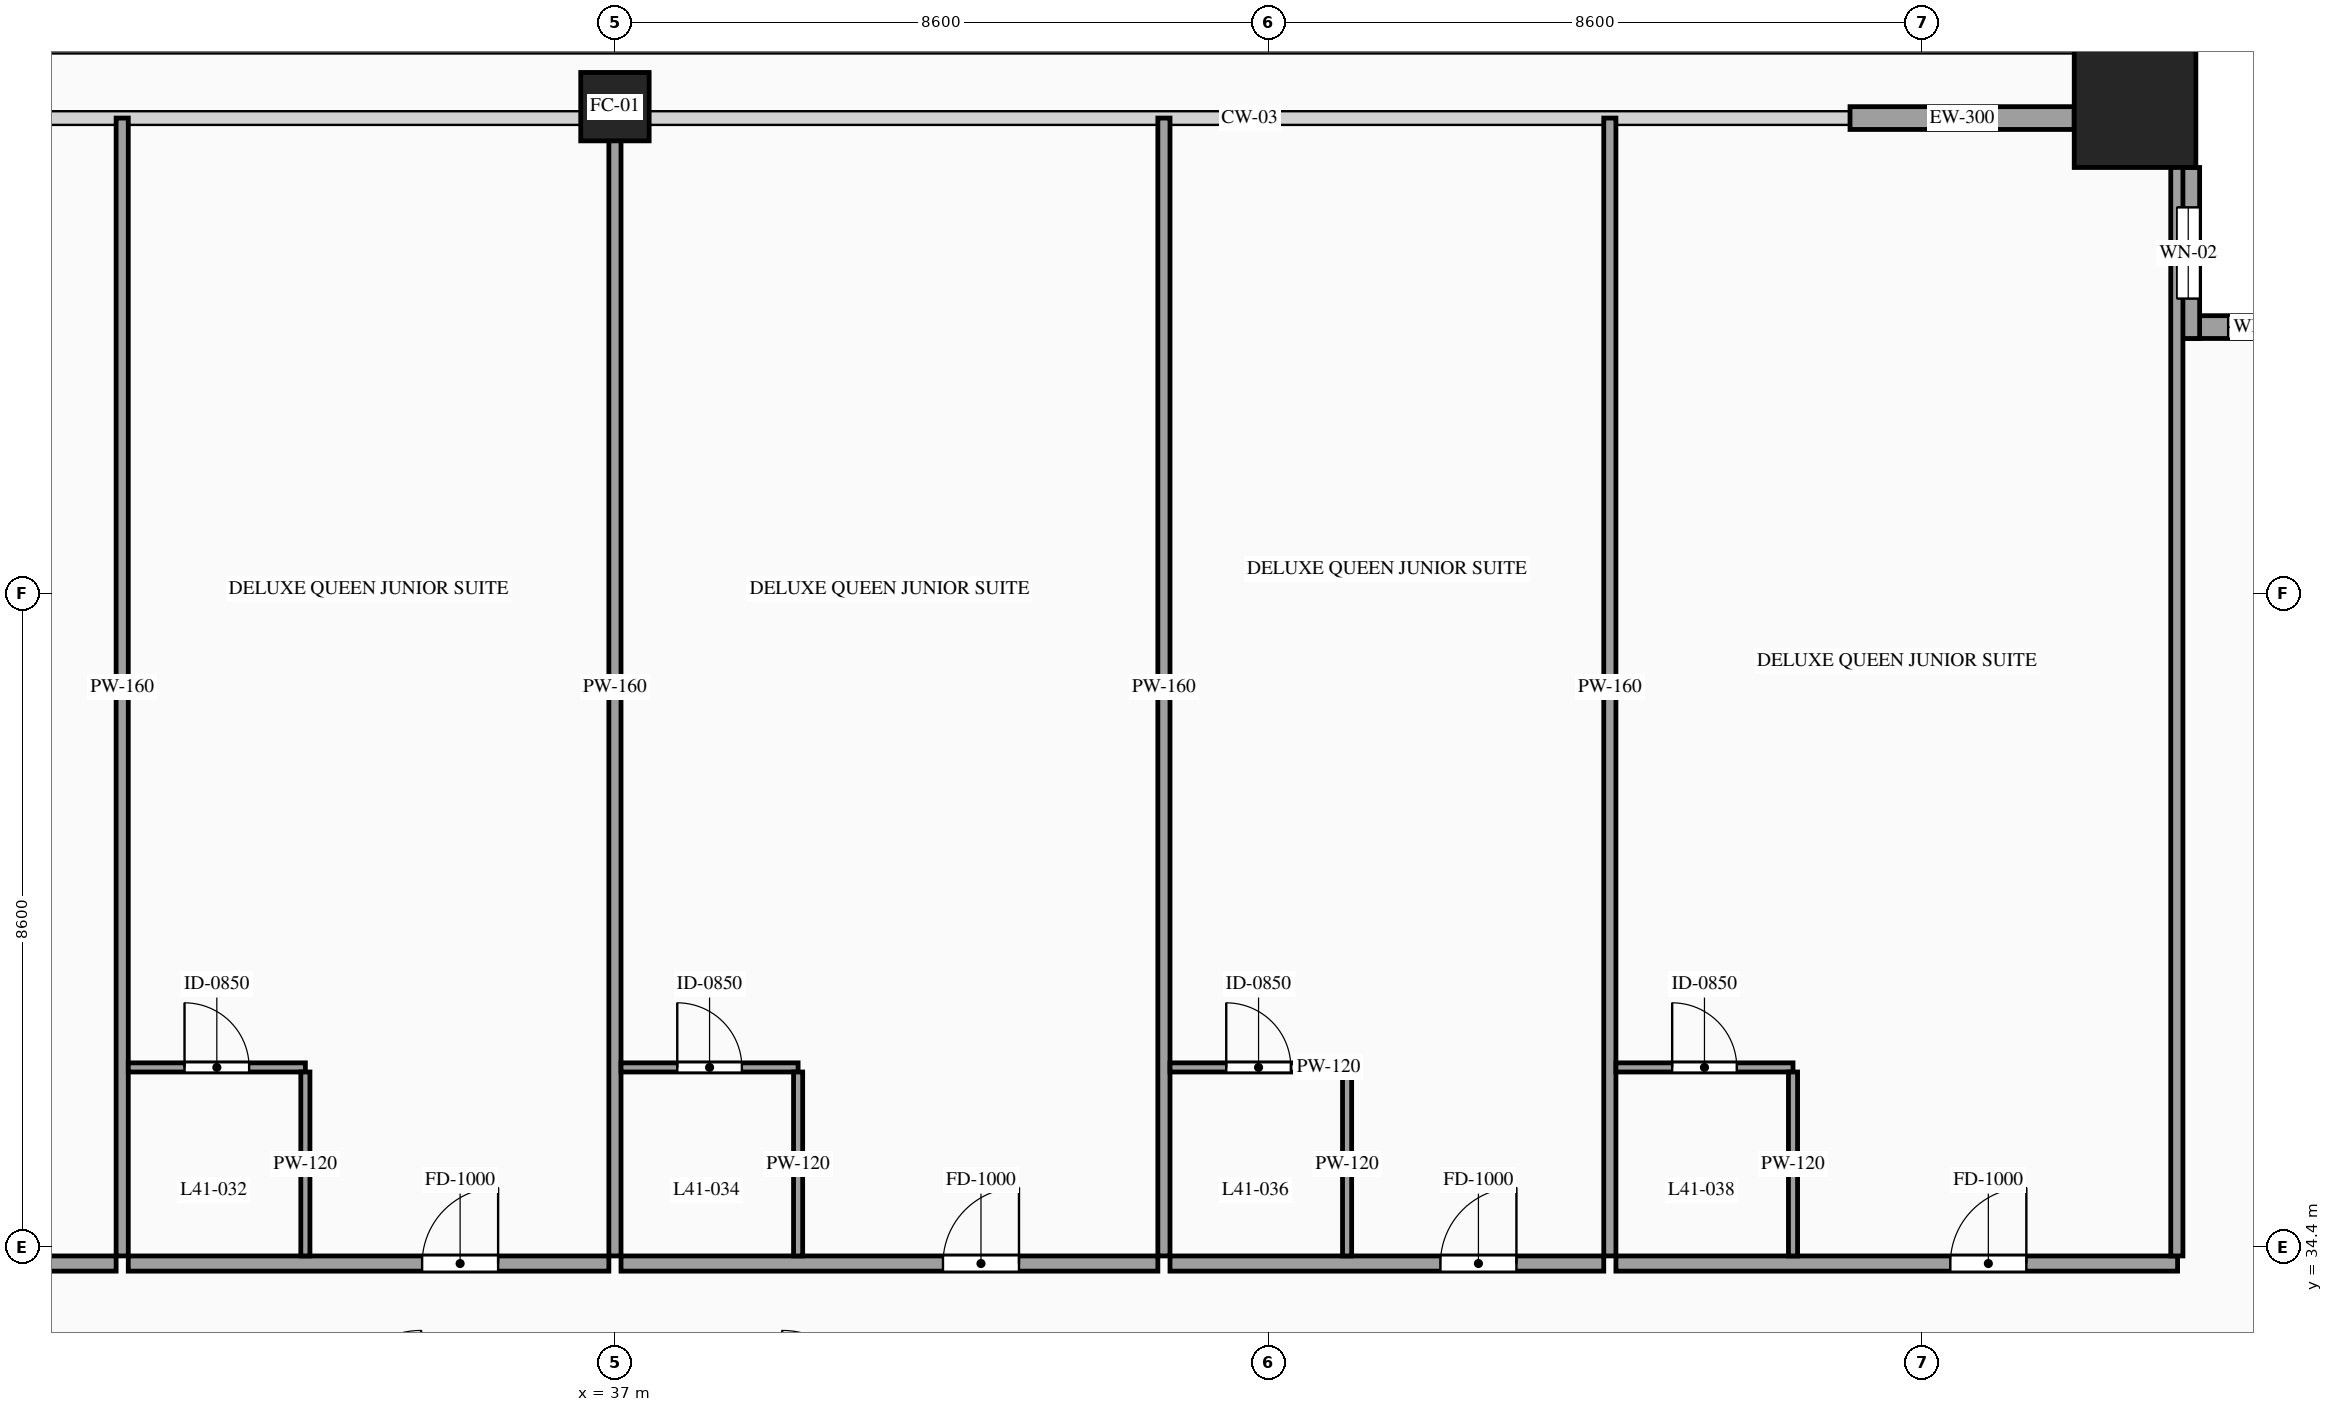
"""IFC4 building model, lengths in metres.
Left out: names, types, materials, properties, quantities, classifications, styles, units other than length and angle.
Written with IfcOpenShell. Run it as: python <this file> out.ifc"""

import sys

from ifc_helpers import new_model, si_unit, direction, frame, frame_2d, origin, origin_2d, place, context, subcontext, project, spatial, rectangle, hollow_rectangle, extrude, source, transform, mapped, element, fill, save


model = new_model("IFC4")
c1 = context("Model", 3, precision=1e-05, world=origin(), true_north=direction((0.0, 1.0)))
c2 = subcontext(c1, "Body", "Model", "MODEL_VIEW")
j1 = project(units=[si_unit("LENGTHUNIT", "METRE"), si_unit("PLANEANGLEUNIT", "RADIAN")], contexts=[c1])
p1 = place(None, origin())
s1 = spatial("IfcSite", under=j1, at=p1, CompositionType="ELEMENT")
p2 = place(p1, origin())
s2 = spatial("IfcBuilding", under=s1, at=p2, CompositionType="ELEMENT")
p3 = place(p2, frame((0.0, 0.0, 156.0)))
s3 = spatial("IfcBuildingStorey", under=s2, at=p3, CompositionType="ELEMENT", Elevation=156.0)
m1 = source(origin(), c2, "Body", "SweptSolid", [
    extrude(hollow_rectangle(XDim=0.9, YDim=0.9, WallThickness=0.042, at=origin_2d()), origin(), (0.0, 0.0, 1.0), 3.6),
])
p4 = place(p3, frame((37.0, 49.4, 0.0), z_axis=(0.0, 0.0, 1.0), x_axis=(1.0, 0.0, 0.0)))
e1 = element("IfcColumn", 1, at=p4, inside=s3, PredefinedType="COLUMN", context=c2, shape_type="MappedRepresentation", body=[
    mapped(m1, transform((0.0, 0.0, 0.0), scale=1.0)),
])
m2 = source(origin(), c2, "Body", "SweptSolid", [
    extrude(hollow_rectangle(XDim=1.6, YDim=1.6, WallThickness=0.07, at=origin_2d()), origin(), (0.0, 0.0, 1.0), 3.6),
])
p5 = place(p3, frame((57.0, 49.4, 0.0), z_axis=(0.0, 0.0, 1.0), x_axis=(1.0, 0.0, 0.0)))
e2 = element("IfcColumn", 2, at=p5, inside=s3, PredefinedType="COLUMN", context=c2, shape_type="MappedRepresentation", body=[
    mapped(m2, transform((0.0, 0.0, 0.0), scale=1.0)),
])
p6 = place(p3, frame((59.8, 46.5, 0.0), z_axis=(0.0, 0.0, 1.0), x_axis=(-1.0, 0.0, 0.0)))
e3 = element("IfcWall", 3, at=p6, inside=s3, PredefinedType="SOLIDWALL", context=c2, shape_type="SweptSolid", body=[
    extrude(rectangle(XDim=2.25, YDim=0.3, at=frame_2d((1.125, 0.0))), origin(), (0.0, 0.0, 1.0), 3.38),
])
p7 = place(p6, frame((0.675, 0.0, 0.85)))
e4 = element("IfcOpeningElement", 4, at=p7, cuts=e3, PredefinedType="OPENING", context=c2, shape_type="SweptSolid", body=[
    extrude(rectangle(XDim=0.9, YDim=1.5, at=frame_2d((0.45, 0.75))), frame((0.0, 0.165, 0.0), z_axis=(0.0, -1.0, 0.0), x_axis=(1.0, 0.0, 0.0)), (0.0, 0.0, 1.0), 0.33),
])
p8 = place(p3, frame((57.7, 46.35, 0.0), z_axis=(0.0, 0.0, 1.0), x_axis=(0.0, 1.0, 0.0)))
e5 = element("IfcWall", 5, at=p8, inside=s3, PredefinedType="SOLIDWALL", context=c2, shape_type="SweptSolid", body=[
    extrude(rectangle(XDim=2.25, YDim=0.3, at=frame_2d((1.125, 0.0))), origin(), (0.0, 0.0, 1.0), 3.38),
])
p9 = place(p8, frame((0.525, 0.0, 0.85)))
e6 = element("IfcOpeningElement", 6, at=p9, cuts=e5, PredefinedType="OPENING", context=c2, shape_type="SweptSolid", body=[
    extrude(rectangle(XDim=1.2, YDim=2.1, at=frame_2d((0.6, 1.05))), frame((0.0, 0.165, 0.0), z_axis=(0.0, -1.0, 0.0), x_axis=(1.0, 0.0, 0.0)), (0.0, 0.0, 1.0), 0.33),
])
m3 = source(origin(), c2, "Body", "SweptSolid", [
    extrude(rectangle(XDim=2.95, YDim=0.3, at=frame_2d((1.475, 0.0))), origin(), (0.0, 0.0, 1.0), 2.775),
])
p10 = place(p3, frame((53.25, 49.25, 0.0), z_axis=(0.0, 0.0, 1.0), x_axis=(1.0, 0.0, 0.0)))
e7 = element("IfcWall", 7, at=p10, inside=s3, PredefinedType="SOLIDWALL", context=c2, shape_type="MappedRepresentation", body=[
    mapped(m3, transform((0.0, 0.0, 0.0), scale=1.0)),
])
p11 = place(p3, frame((22.757, 34.18, 0.0), z_axis=(0.0, 0.0, 1.0), x_axis=(1.0, 0.0, 0.0)))
e8 = element("IfcWall", 8, at=p11, inside=s3, PredefinedType="PARTITIONING", context=c2, shape_type="SweptSolid", body=[
    extrude(rectangle(XDim=7.68, YDim=0.2, at=frame_2d((3.84, 0.0))), origin(), (0.0, 0.0, 1.0), 3.38),
])
p12 = place(p11, frame((4.545, 0.0, 0.0)))
e9 = element("IfcOpeningElement", 9, at=p12, cuts=e8, PredefinedType="OPENING", context=c2, shape_type="SweptSolid", body=[
    extrude(rectangle(XDim=1.0, YDim=2.2, at=frame_2d((0.5, 1.1))), frame((0.0, 0.115, 0.0), z_axis=(0.0, -1.0, 0.0), x_axis=(1.0, 0.0, 0.0)), (0.0, 0.0, 1.0), 0.23),
])
m4 = source(origin(), c2, "Body", "SweptSolid", [
    extrude(rectangle(XDim=14.97, YDim=0.16, at=frame_2d((7.485, 0.0))), origin(), (0.0, 0.0, 1.0), 3.38),
])
p13 = place(p3, frame((30.517, 34.28, 0.0), z_axis=(0.0, 0.0, 1.0), x_axis=(0.0, 1.0, 0.0)))
e10 = element("IfcWall", 10, at=p13, inside=s3, PredefinedType="PARTITIONING", context=c2, shape_type="MappedRepresentation", body=[
    mapped(m4, transform((0.0, 0.0, 0.0), scale=1.0)),
])
p14 = place(p3, frame((30.597, 34.18, 0.0), z_axis=(0.0, 0.0, 1.0), x_axis=(1.0, 0.0, 0.0)))
e11 = element("IfcWall", 11, at=p14, inside=s3, PredefinedType="PARTITIONING", context=c2, shape_type="SweptSolid", body=[
    extrude(rectangle(XDim=6.323, YDim=0.2, at=frame_2d((3.162, 0.0))), origin(), (0.0, 0.0, 1.0), 3.38),
])
p15 = place(p14, frame((3.866, 0.0, 0.0)))
e12 = element("IfcOpeningElement", 12, at=p15, cuts=e11, PredefinedType="OPENING", context=c2, shape_type="SweptSolid", body=[
    extrude(rectangle(XDim=1.0, YDim=2.2, at=frame_2d((0.5, 1.1))), frame((0.0, 0.115, 0.0), z_axis=(0.0, -1.0, 0.0), x_axis=(1.0, 0.0, 0.0)), (0.0, 0.0, 1.0), 0.23),
])
m5 = source(origin(), c2, "Body", "SweptSolid", [
    extrude(rectangle(XDim=14.97, YDim=0.16, at=frame_2d((7.485, 0.0))), origin(), (0.0, 0.0, 1.0), 2.675),
])
p16 = place(p3, frame((37.0, 34.28, 0.0), z_axis=(0.0, 0.0, 1.0), x_axis=(0.0, 1.0, 0.0)))
e13 = element("IfcWall", 13, at=p16, inside=s3, PredefinedType="PARTITIONING", context=c2, shape_type="MappedRepresentation", body=[
    mapped(m5, transform((0.0, 0.0, 0.0), scale=1.0)),
])
p17 = place(p3, frame((30.597, 36.76, 0.0), z_axis=(0.0, 0.0, 1.0), x_axis=(1.0, 0.0, 0.0)))
e14 = element("IfcWall", 14, at=p17, inside=s3, PredefinedType="PARTITIONING", context=c2, shape_type="SweptSolid", body=[
    extrude(rectangle(XDim=2.33, YDim=0.12, at=frame_2d((1.165, 0.0))), origin(), (0.0, 0.0, 1.0), 3.38),
])
p18 = place(p17, frame((0.74, 0.0, 0.0)))
e15 = element("IfcOpeningElement", 15, at=p18, cuts=e14, PredefinedType="OPENING", context=c2, shape_type="SweptSolid", body=[
    extrude(rectangle(XDim=0.85, YDim=2.1, at=frame_2d((0.425, 1.05))), frame((0.0, 0.075, 0.0), z_axis=(0.0, -1.0, 0.0), x_axis=(1.0, 0.0, 0.0)), (0.0, 0.0, 1.0), 0.15),
])
m6 = source(origin(), c2, "Body", "SweptSolid", [
    extrude(rectangle(XDim=2.42, YDim=0.12, at=frame_2d((1.21, 0.0))), origin(), (0.0, 0.0, 1.0), 3.38),
])
p19 = place(p3, frame((32.927, 34.28, 0.0), z_axis=(0.0, 0.0, 1.0), x_axis=(0.0, 1.0, 0.0)))
e16 = element("IfcWall", 16, at=p19, inside=s3, PredefinedType="PARTITIONING", context=c2, shape_type="MappedRepresentation", body=[
    mapped(m6, transform((0.0, 0.0, 0.0), scale=1.0)),
])
p20 = place(p3, frame((37.08, 34.18, 0.0), z_axis=(0.0, 0.0, 1.0), x_axis=(1.0, 0.0, 0.0)))
e17 = element("IfcWall", 17, at=p20, inside=s3, PredefinedType="PARTITIONING", context=c2, shape_type="SweptSolid", body=[
    extrude(rectangle(XDim=7.063, YDim=0.2, at=frame_2d((3.531, 0.0))), origin(), (0.0, 0.0, 1.0), 3.38),
])
p21 = place(p20, frame((4.236, 0.0, 0.0)))
e18 = element("IfcOpeningElement", 18, at=p21, cuts=e17, PredefinedType="OPENING", context=c2, shape_type="SweptSolid", body=[
    extrude(rectangle(XDim=1.0, YDim=2.2, at=frame_2d((0.5, 1.1))), frame((0.0, 0.115, 0.0), z_axis=(0.0, -1.0, 0.0), x_axis=(1.0, 0.0, 0.0)), (0.0, 0.0, 1.0), 0.23),
])
p22 = place(p3, frame((44.223, 34.28, 0.0), z_axis=(0.0, 0.0, 1.0), x_axis=(0.0, 1.0, 0.0)))
e19 = element("IfcWall", 19, at=p22, inside=s3, PredefinedType="PARTITIONING", context=c2, shape_type="MappedRepresentation", body=[
    mapped(m4, transform((0.0, 0.0, 0.0), scale=1.0)),
])
p23 = place(p3, frame((37.08, 36.76, 0.0), z_axis=(0.0, 0.0, 1.0), x_axis=(1.0, 0.0, 0.0)))
e20 = element("IfcWall", 20, at=p23, inside=s3, PredefinedType="PARTITIONING", context=c2, shape_type="SweptSolid", body=[
    extrude(rectangle(XDim=2.33, YDim=0.12, at=frame_2d((1.165, 0.0))), origin(), (0.0, 0.0, 1.0), 3.38),
])
p24 = place(p23, frame((0.74, 0.0, 0.0)))
e21 = element("IfcOpeningElement", 21, at=p24, cuts=e20, PredefinedType="OPENING", context=c2, shape_type="SweptSolid", body=[
    extrude(rectangle(XDim=0.85, YDim=2.1, at=frame_2d((0.425, 1.05))), frame((0.0, 0.075, 0.0), z_axis=(0.0, -1.0, 0.0), x_axis=(1.0, 0.0, 0.0)), (0.0, 0.0, 1.0), 0.15),
])
p25 = place(p3, frame((39.41, 34.28, 0.0), z_axis=(0.0, 0.0, 1.0), x_axis=(0.0, 1.0, 0.0)))
e22 = element("IfcWall", 22, at=p25, inside=s3, PredefinedType="PARTITIONING", context=c2, shape_type="MappedRepresentation", body=[
    mapped(m6, transform((0.0, 0.0, 0.0), scale=1.0)),
])
p26 = place(p3, frame((44.303, 34.18, 0.0), z_axis=(0.0, 0.0, 1.0), x_axis=(1.0, 0.0, 0.0)))
e23 = element("IfcWall", 23, at=p26, inside=s3, PredefinedType="PARTITIONING", context=c2, shape_type="SweptSolid", body=[
    extrude(rectangle(XDim=5.707, YDim=0.2, at=frame_2d((2.854, 0.0))), origin(), (0.0, 0.0, 1.0), 3.38),
])
p27 = place(p26, frame((3.558, 0.0, 0.0)))
e24 = element("IfcOpeningElement", 24, at=p27, cuts=e23, PredefinedType="OPENING", context=c2, shape_type="SweptSolid", body=[
    extrude(rectangle(XDim=1.0, YDim=2.2, at=frame_2d((0.5, 1.1))), frame((0.0, 0.115, 0.0), z_axis=(0.0, -1.0, 0.0), x_axis=(1.0, 0.0, 0.0)), (0.0, 0.0, 1.0), 0.23),
])
m7 = source(origin(), c2, "Body", "SweptSolid", [
    extrude(rectangle(XDim=14.97, YDim=0.16, at=frame_2d((7.485, 0.0))), origin(), (0.0, 0.0, 1.0), 2.875),
])
p28 = place(p3, frame((50.09, 34.28, 0.0), z_axis=(0.0, 0.0, 1.0), x_axis=(0.0, 1.0, 0.0)))
e25 = element("IfcWall", 25, at=p28, inside=s3, PredefinedType="PARTITIONING", context=c2, shape_type="MappedRepresentation", body=[
    mapped(m7, transform((0.0, 0.0, 0.0), scale=1.0)),
])
p29 = place(p3, frame((44.303, 36.76, 0.0), z_axis=(0.0, 0.0, 1.0), x_axis=(1.0, 0.0, 0.0)))
e26 = element("IfcWall", 26, at=p29, inside=s3, PredefinedType="PARTITIONING", context=c2, shape_type="SweptSolid", body=[
    extrude(rectangle(XDim=2.33, YDim=0.12, at=frame_2d((1.165, 0.0))), origin(), (0.0, 0.0, 1.0), 3.38),
])
p30 = place(p29, frame((0.74, 0.0, 0.0)))
e27 = element("IfcOpeningElement", 27, at=p30, cuts=e26, PredefinedType="OPENING", context=c2, shape_type="SweptSolid", body=[
    extrude(rectangle(XDim=0.85, YDim=2.1, at=frame_2d((0.425, 1.05))), frame((0.0, 0.075, 0.0), z_axis=(0.0, -1.0, 0.0), x_axis=(1.0, 0.0, 0.0)), (0.0, 0.0, 1.0), 0.15),
])
p31 = place(p3, frame((46.633, 34.28, 0.0), z_axis=(0.0, 0.0, 1.0), x_axis=(0.0, 1.0, 0.0)))
e28 = element("IfcWall", 28, at=p31, inside=s3, PredefinedType="PARTITIONING", context=c2, shape_type="MappedRepresentation", body=[
    mapped(m6, transform((0.0, 0.0, 0.0), scale=1.0)),
])
p32 = place(p3, frame((50.17, 34.18, 0.0), z_axis=(0.0, 0.0, 1.0), x_axis=(1.0, 0.0, 0.0)))
e29 = element("IfcWall", 29, at=p32, inside=s3, PredefinedType="PARTITIONING", context=c2, shape_type="SweptSolid", body=[
    extrude(rectangle(XDim=7.39, YDim=0.2, at=frame_2d((3.695, 0.0))), origin(), (0.0, 0.0, 1.0), 3.38),
])
p33 = place(p32, frame((4.4, 0.0, 0.0)))
e30 = element("IfcOpeningElement", 30, at=p33, cuts=e29, PredefinedType="OPENING", context=c2, shape_type="SweptSolid", body=[
    extrude(rectangle(XDim=1.0, YDim=2.2, at=frame_2d((0.5, 1.1))), frame((0.0, 0.115, 0.0), z_axis=(0.0, -1.0, 0.0), x_axis=(1.0, 0.0, 0.0)), (0.0, 0.0, 1.0), 0.23),
])
m8 = source(origin(), c2, "Body", "SweptSolid", [
    extrude(rectangle(XDim=14.82, YDim=0.16, at=frame_2d((7.41, 0.0))), origin(), (0.0, 0.0, 1.0), 3.38),
])
p34 = place(p3, frame((57.55, 34.28, 0.0), z_axis=(0.0, 0.0, 1.0), x_axis=(0.0, 1.0, 0.0)))
e31 = element("IfcWall", 31, at=p34, inside=s3, PredefinedType="PARTITIONING", context=c2, shape_type="MappedRepresentation", body=[
    mapped(m8, transform((0.0, 0.0, 0.0), scale=1.0)),
])
p35 = place(p3, frame((50.17, 36.76, 0.0), z_axis=(0.0, 0.0, 1.0), x_axis=(1.0, 0.0, 0.0)))
e32 = element("IfcWall", 32, at=p35, inside=s3, PredefinedType="PARTITIONING", context=c2, shape_type="SweptSolid", body=[
    extrude(rectangle(XDim=2.33, YDim=0.12, at=frame_2d((1.165, 0.0))), origin(), (0.0, 0.0, 1.0), 3.38),
])
p36 = place(p35, frame((0.74, 0.0, 0.0)))
e33 = element("IfcOpeningElement", 33, at=p36, cuts=e32, PredefinedType="OPENING", context=c2, shape_type="SweptSolid", body=[
    extrude(rectangle(XDim=0.85, YDim=2.1, at=frame_2d((0.425, 1.05))), frame((0.0, 0.075, 0.0), z_axis=(0.0, -1.0, 0.0), x_axis=(1.0, 0.0, 0.0)), (0.0, 0.0, 1.0), 0.15),
])
p37 = place(p3, frame((52.5, 34.28, 0.0), z_axis=(0.0, 0.0, 1.0), x_axis=(0.0, 1.0, 0.0)))
e34 = element("IfcWall", 34, at=p37, inside=s3, PredefinedType="PARTITIONING", context=c2, shape_type="MappedRepresentation", body=[
    mapped(m6, transform((0.0, 0.0, 0.0), scale=1.0)),
])
m9 = source(origin(), c2, "Body", "SweptSolid", [
    extrude(rectangle(XDim=0.9, YDim=1.5, at=frame_2d((0.45, 0.75))), frame((0.0, 0.03, 0.0), z_axis=(0.0, -1.0, 0.0), x_axis=(1.0, 0.0, 0.0)), (0.0, 0.0, 1.0), 0.06),
])
p38 = place(p7, origin())
e35 = element("IfcWindow", 35, at=p38, inside=s3, PartitioningType="SINGLE_PANEL", PredefinedType="WINDOW", context=c2, shape_type="MappedRepresentation", body=[
    mapped(m9, transform((0.0, 0.0, 0.0), scale=1.0)),
])
fill(e4, e35)
m10 = source(origin(), c2, "Body", "SweptSolid", [
    extrude(rectangle(XDim=1.2, YDim=2.1, at=frame_2d((0.6, 1.05))), frame((0.0, 0.03, 0.0), z_axis=(0.0, -1.0, 0.0), x_axis=(1.0, 0.0, 0.0)), (0.0, 0.0, 1.0), 0.06),
])
p39 = place(p9, origin())
e36 = element("IfcWindow", 36, at=p39, inside=s3, PartitioningType="SINGLE_PANEL", PredefinedType="WINDOW", context=c2, shape_type="MappedRepresentation", body=[
    mapped(m10, transform((0.0, 0.0, 0.0), scale=1.0)),
])
fill(e6, e36)
m11 = source(origin(), c2, "Body", "SweptSolid", [
    extrude(rectangle(XDim=1.0, YDim=2.2, at=frame_2d((0.5, 1.1))), frame((0.0, 0.025, 0.0), z_axis=(0.0, -1.0, 0.0), x_axis=(1.0, 0.0, 0.0)), (0.0, 0.0, 1.0), 0.05),
])
p40 = place(p15, origin())
e37 = element("IfcDoor", 37, at=p40, inside=s3, OperationType="SINGLE_SWING_RIGHT", PredefinedType="DOOR", context=c2, shape_type="MappedRepresentation", body=[
    mapped(m11, transform((0.0, 0.0, 0.0), scale=1.0)),
])
fill(e12, e37)
m12 = source(origin(), c2, "Body", "SweptSolid", [
    extrude(rectangle(XDim=0.85, YDim=2.1, at=frame_2d((0.425, 1.05))), frame((0.0, 0.025, 0.0), z_axis=(0.0, -1.0, 0.0), x_axis=(1.0, 0.0, 0.0)), (0.0, 0.0, 1.0), 0.05),
])
p41 = place(p18, origin())
e38 = element("IfcDoor", 38, at=p41, inside=s3, OperationType="SINGLE_SWING_LEFT", PredefinedType="DOOR", context=c2, shape_type="MappedRepresentation", body=[
    mapped(m12, transform((0.0, 0.0, 0.0), scale=1.0)),
])
fill(e15, e38)
p42 = place(p21, origin())
e39 = element("IfcDoor", 39, at=p42, inside=s3, OperationType="SINGLE_SWING_RIGHT", PredefinedType="DOOR", context=c2, shape_type="MappedRepresentation", body=[
    mapped(m11, transform((0.0, 0.0, 0.0), scale=1.0)),
])
fill(e18, e39)
p43 = place(p24, origin())
e40 = element("IfcDoor", 40, at=p43, inside=s3, OperationType="SINGLE_SWING_LEFT", PredefinedType="DOOR", context=c2, shape_type="MappedRepresentation", body=[
    mapped(m12, transform((0.0, 0.0, 0.0), scale=1.0)),
])
fill(e21, e40)
p44 = place(p27, origin())
e41 = element("IfcDoor", 41, at=p44, inside=s3, OperationType="SINGLE_SWING_RIGHT", PredefinedType="DOOR", context=c2, shape_type="MappedRepresentation", body=[
    mapped(m11, transform((0.0, 0.0, 0.0), scale=1.0)),
])
fill(e24, e41)
p45 = place(p30, origin())
e42 = element("IfcDoor", 42, at=p45, inside=s3, OperationType="SINGLE_SWING_LEFT", PredefinedType="DOOR", context=c2, shape_type="MappedRepresentation", body=[
    mapped(m12, transform((0.0, 0.0, 0.0), scale=1.0)),
])
fill(e27, e42)
p46 = place(p33, origin())
e43 = element("IfcDoor", 43, at=p46, inside=s3, OperationType="SINGLE_SWING_RIGHT", PredefinedType="DOOR", context=c2, shape_type="MappedRepresentation", body=[
    mapped(m11, transform((0.0, 0.0, 0.0), scale=1.0)),
])
fill(e30, e43)
p47 = place(p36, origin())
e44 = element("IfcDoor", 44, at=p47, inside=s3, OperationType="SINGLE_SWING_LEFT", PredefinedType="DOOR", context=c2, shape_type="MappedRepresentation", body=[
    mapped(m12, transform((0.0, 0.0, 0.0), scale=1.0)),
])
fill(e33, e44)
save(model, sys.argv[1])
